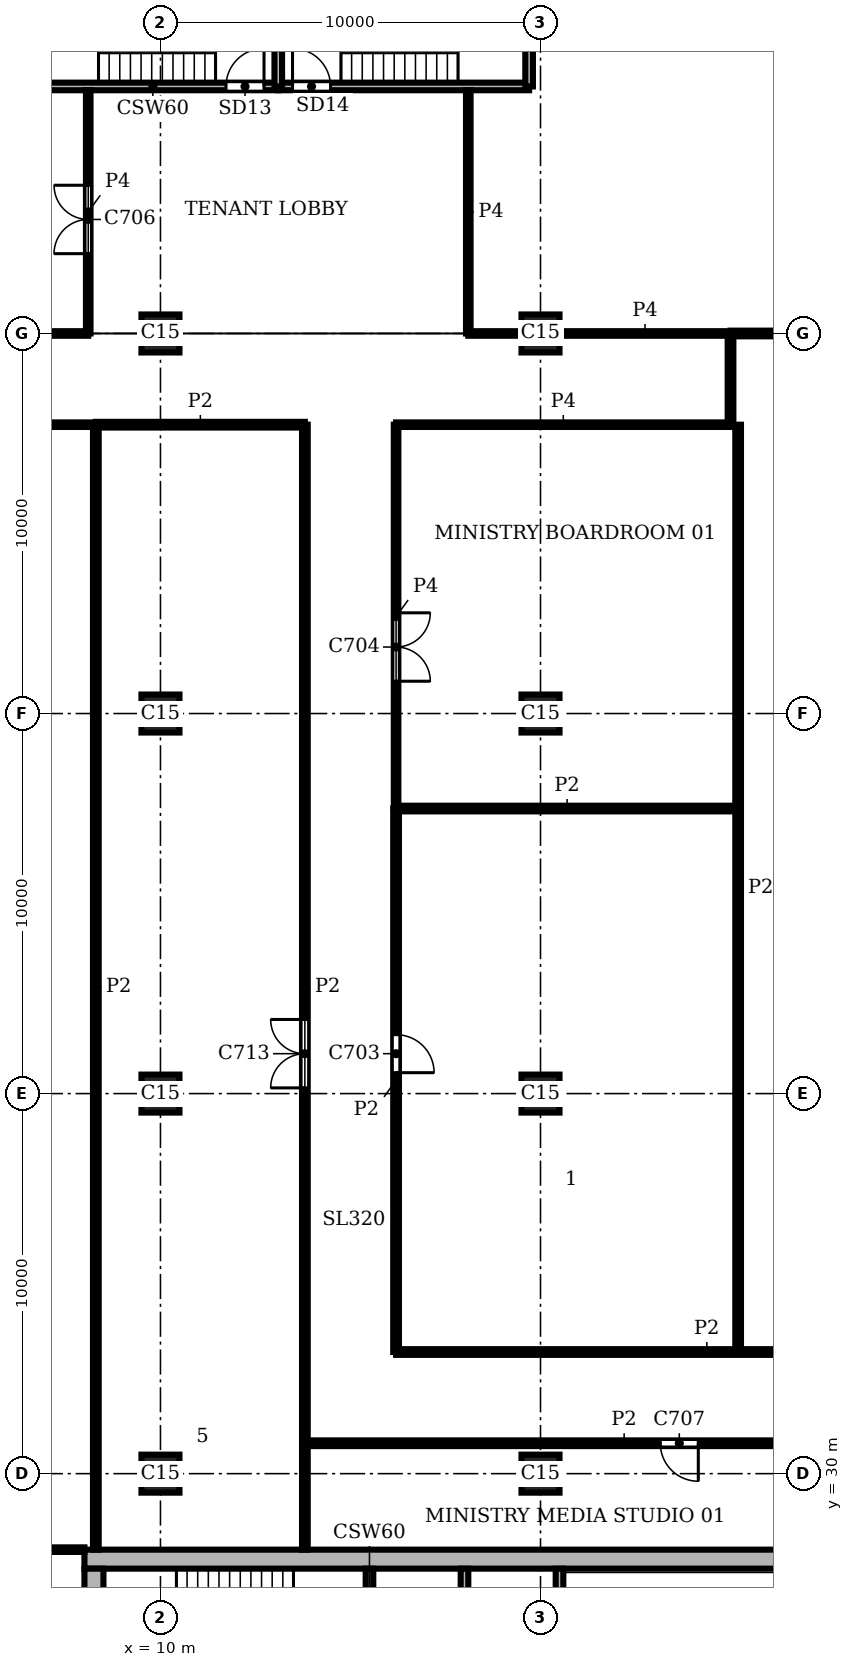
"""IFC4 building model, lengths in metres.
Left out: names, types, materials, properties, quantities, classifications, styles, units other than length and angle.
Written with IfcOpenShell. Run it as: python <this file> out.ifc"""

import sys

from ifc_helpers import new_model, si_unit, direction, frame, frame_2d, origin, origin_2d, place, context, subcontext, project, spatial, rectangle, extrude, element, fill, save


model = new_model("IFC4")
c1 = context("Model", 3, precision=1e-05, world=origin(), true_north=direction((0.0, 1.0)))
c2 = subcontext(c1, "Body", "Model", "MODEL_VIEW")
j1 = project(units=[si_unit("LENGTHUNIT", "METRE"), si_unit("PLANEANGLEUNIT", "RADIAN")], contexts=[c1])
p1 = place(None, origin())
s1 = spatial("IfcSite", under=j1, at=p1, CompositionType="ELEMENT")
p2 = place(p1, origin())
s2 = spatial("IfcBuilding", under=s1, at=p2, CompositionType="ELEMENT")
p3 = place(p2, frame((0.0, 0.0, 306.0)))
s3 = spatial("IfcBuildingStorey", under=s2, at=p3, CompositionType="ELEMENT", Elevation=306.0)
for number, where, z_axis, x_axis in (
    (1, (10.0, 30.0, 0.0), (0.0, 0.0, 1.0), (1.0, 0.0, 0.0)),
    (2, (10.0, 40.0, 0.0), (0.0, 0.0, 1.0), (1.0, 0.0, 0.0)),
    (3, (10.0, 50.0, 0.0), (0.0, 0.0, 1.0), (1.0, 0.0, 0.0)),
    (4, (10.0, 60.0, 0.0), (0.0, 0.0, 1.0), (1.0, 0.0, 0.0)),
    (5, (20.0, 30.0, 0.0), (0.0, 0.0, 1.0), (1.0, 0.0, 0.0)),
    (6, (20.0, 40.0, 0.0), (0.0, 0.0, 1.0), (1.0, 0.0, 0.0)),
    (7, (20.0, 50.0, 0.0), (0.0, 0.0, 1.0), (1.0, 0.0, 0.0)),
    (8, (20.0, 60.0, 0.0), (0.0, 0.0, 1.0), (1.0, 0.0, 0.0)),
):
    element("IfcColumn", number, at=place(p3, frame(where, z_axis=z_axis, x_axis=x_axis)), inside=s3, PredefinedType="COLUMN", context=c2, shape_type="SweptSolid", body=[
        extrude(rectangle(XDim=1.0, YDim=1.0, at=origin_2d()), origin(), (0.0, 0.0, 1.0), 3.9),
    ])
p4 = place(p3, frame((28.0, 27.75, 0.0), z_axis=(0.0, 0.0, 1.0), x_axis=(-1.0, 0.0, 0.0)))
e9 = element("IfcWall", 9, at=p4, inside=s3, PredefinedType="SHEAR", context=c2, shape_type="SweptSolid", body=[
    extrude(rectangle(XDim=20.0, YDim=0.5, at=frame_2d((10.0, 0.0))), origin(), (0.0, 0.0, 1.0), 3.9),
])
p5 = place(p3, frame((8.25, 27.5, 0.0), z_axis=(0.0, 0.0, 1.0), x_axis=(0.0, -1.0, 0.0)))
e10 = element("IfcWall", 10, at=p5, inside=s3, PredefinedType="SHEAR", context=c2, shape_type="SweptSolid", body=[
    extrude(rectangle(XDim=19.0, YDim=0.5, at=frame_2d((9.5, 0.0))), origin(), (0.0, 0.0, 1.0), 3.9),
])
p6 = place(p3, frame((6.5, 66.5, 0.0), z_axis=(0.0, 0.0, 1.0), x_axis=(1.0, 0.0, 0.0)))
e11 = element("IfcWall", 11, at=p6, inside=s3, PredefinedType="SHEAR", context=c2, shape_type="SweptSolid", body=[
    extrude(rectangle(XDim=6.6, YDim=0.2, at=frame_2d((3.3, 0.0))), origin(), (0.0, 0.0, 1.0), 3.58),
])
p7 = place(p6, frame((5.225, 0.0, 0.0)))
e12 = element("IfcOpeningElement", 12, at=p7, cuts=e11, PredefinedType="OPENING", context=c2, shape_type="SweptSolid", body=[
    extrude(rectangle(XDim=1.0, YDim=2.1, at=frame_2d((0.5, 1.05))), frame((0.0, 0.11, 0.0), z_axis=(0.0, -1.0, 0.0), x_axis=(1.0, 0.0, 0.0)), (0.0, 0.0, 1.0), 0.22),
])
p8 = place(p3, frame((13.1, 66.5, 0.0), z_axis=(0.0, 0.0, 1.0), x_axis=(1.0, 0.0, 0.0)))
e13 = element("IfcWall", 13, at=p8, inside=s3, PredefinedType="SHEAR", context=c2, shape_type="SweptSolid", body=[
    extrude(rectangle(XDim=6.6, YDim=0.2, at=frame_2d((3.3, 0.0))), origin(), (0.0, 0.0, 1.0), 3.58),
])
p9 = place(p8, frame((0.375, 0.0, 0.0)))
e14 = element("IfcOpeningElement", 14, at=p9, cuts=e13, PredefinedType="OPENING", context=c2, shape_type="SweptSolid", body=[
    extrude(rectangle(XDim=1.0, YDim=2.1, at=frame_2d((0.5, 1.05))), frame((0.0, 0.11, 0.0), z_axis=(0.0, -1.0, 0.0), x_axis=(1.0, 0.0, 0.0)), (0.0, 0.0, 1.0), 0.22),
])
p10 = place(p3, frame((13.1, 66.5, 0.0), z_axis=(0.0, 0.0, 1.0), x_axis=(0.0, 1.0, 0.0)))
e15 = element("IfcWall", 15, at=p10, inside=s3, PredefinedType="SHEAR", context=c2, shape_type="SweptSolid", body=[
    extrude(rectangle(XDim=3.3, YDim=0.2, at=frame_2d((1.65, 0.0))), origin(), (0.0, 0.0, 1.0), 3.58),
])
p11 = place(p3, frame((15.5, 23.6, 0.0), z_axis=(0.0, 0.0, 1.0), x_axis=(0.0, 1.0, 0.0)))
e16 = element("IfcWall", 16, at=p11, inside=s3, PredefinedType="SHEAR", context=c2, shape_type="SweptSolid", body=[
    extrude(rectangle(XDim=3.9, YDim=0.2, at=frame_2d((1.95, 0.0))), origin(), (0.0, 0.0, 1.0), 3.58),
])
p12 = place(p3, frame((18.0, 20.0, 0.0), z_axis=(0.0, 0.0, 1.0), x_axis=(0.0, 1.0, 0.0)))
e17 = element("IfcWall", 17, at=p12, inside=s3, PredefinedType="SHEAR", context=c2, shape_type="SweptSolid", body=[
    extrude(rectangle(XDim=7.5, YDim=0.2, at=frame_2d((3.75, 0.0))), origin(), (0.0, 0.0, 1.0), 3.58),
])
p13 = place(p12, frame((1.2, 0.0, 0.0)))
e18 = element("IfcOpeningElement", 18, at=p13, cuts=e17, PredefinedType="OPENING", context=c2, shape_type="SweptSolid", body=[
    extrude(rectangle(XDim=1.2, YDim=2.1, at=frame_2d((0.6, 1.05))), frame((0.0, 0.11, 0.0), z_axis=(0.0, -1.0, 0.0), x_axis=(1.0, 0.0, 0.0)), (0.0, 0.0, 1.0), 0.22),
])
p14 = place(p3, frame((19.7, 66.5, 0.0), z_axis=(0.0, 0.0, 1.0), x_axis=(0.0, 1.0, 0.0)))
e19 = element("IfcWall", 19, at=p14, inside=s3, PredefinedType="SHEAR", context=c2, shape_type="SweptSolid", body=[
    extrude(rectangle(XDim=3.3, YDim=0.2, at=frame_2d((1.65, 0.0))), origin(), (0.0, 0.0, 1.0), 3.58),
])
p15 = place(p3, frame((20.5, 23.6, 0.0), z_axis=(0.0, 0.0, 1.0), x_axis=(0.0, 1.0, 0.0)))
e20 = element("IfcWall", 20, at=p15, inside=s3, PredefinedType="SHEAR", context=c2, shape_type="SweptSolid", body=[
    extrude(rectangle(XDim=3.9, YDim=0.2, at=frame_2d((1.95, 0.0))), origin(), (0.0, 0.0, 1.0), 3.58),
])
p16 = place(p3, frame((8.3, 28.0, 0.0), z_axis=(0.0, 0.0, 1.0), x_axis=(0.0, 1.0, 0.0)))
e21 = element("IfcWall", 21, at=p16, inside=s3, PredefinedType="PARTITIONING", context=c2, shape_type="SweptSolid", body=[
    extrude(rectangle(XDim=29.6, YDim=0.15, at=frame_2d((14.8, 0.0))), origin(), (0.0, 0.0, 1.0), 3.58),
])
p17 = place(p3, frame((13.8, 28.0, 0.0), z_axis=(0.0, 0.0, 1.0), x_axis=(0.0, 1.0, 0.0)))
e22 = element("IfcWall", 22, at=p17, inside=s3, PredefinedType="PARTITIONING", context=c2, shape_type="SweptSolid", body=[
    extrude(rectangle(XDim=29.6, YDim=0.15, at=frame_2d((14.8, 0.0))), origin(), (0.0, 0.0, 1.0), 3.58),
])
p18 = place(p17, frame((12.15, 0.0, 0.0)))
e23 = element("IfcOpeningElement", 23, at=p18, cuts=e22, PredefinedType="OPENING", context=c2, shape_type="SweptSolid", body=[
    extrude(rectangle(XDim=1.8, YDim=2.1, at=frame_2d((0.9, 1.05))), frame((0.0, 0.085, 0.0), z_axis=(0.0, -1.0, 0.0), x_axis=(1.0, 0.0, 0.0)), (0.0, 0.0, 1.0), 0.17),
])
p19 = place(p3, frame((16.2, 33.2, 0.0), z_axis=(0.0, 0.0, 1.0), x_axis=(0.0, 1.0, 0.0)))
e24 = element("IfcWall", 24, at=p19, inside=s3, PredefinedType="PARTITIONING", context=c2, shape_type="SweptSolid", body=[
    extrude(rectangle(XDim=14.3, YDim=0.15, at=frame_2d((7.15, 0.0))), origin(), (0.0, 0.0, 1.0), 3.58),
])
p20 = place(p19, frame((7.35, 0.0, 0.0)))
e25 = element("IfcOpeningElement", 25, at=p20, cuts=e24, PredefinedType="OPENING", context=c2, shape_type="SweptSolid", body=[
    extrude(rectangle(XDim=1.0, YDim=2.1, at=frame_2d((0.5, 1.05))), frame((0.0, 0.085, 0.0), z_axis=(0.0, -1.0, 0.0), x_axis=(1.0, 0.0, 0.0)), (0.0, 0.0, 1.0), 0.17),
])
p21 = place(p3, frame((25.0, 57.6, 0.0), z_axis=(0.0, 0.0, 1.0), x_axis=(0.0, 1.0, 0.0)))
e26 = element("IfcWall", 26, at=p21, inside=s3, PredefinedType="PARTITIONING", context=c2, shape_type="SweptSolid", body=[
    extrude(rectangle(XDim=2.4, YDim=0.15, at=frame_2d((1.2, 0.0))), origin(), (0.0, 0.0, 1.0), 3.58),
])
p22 = place(p3, frame((25.2, 33.2, 0.0), z_axis=(0.0, 0.0, 1.0), x_axis=(0.0, 1.0, 0.0)))
e27 = element("IfcWall", 27, at=p22, inside=s3, PredefinedType="PARTITIONING", context=c2, shape_type="SweptSolid", body=[
    extrude(rectangle(XDim=24.4, YDim=0.15, at=frame_2d((12.2, 0.0))), origin(), (0.0, 0.0, 1.0), 3.58),
])
p23 = place(p3, frame((13.802, 30.8, 0.0), z_axis=(0.0, 0.0, 1.0), x_axis=(1.0, 0.0, 0.0)))
e28 = element("IfcWall", 28, at=p23, inside=s3, PredefinedType="PARTITIONING", context=c2, shape_type="SweptSolid", body=[
    extrude(rectangle(XDim=16.797, YDim=0.15, at=frame_2d((8.398, 0.0))), origin(), (0.0, 0.0, 1.0), 3.58),
])
p24 = place(p23, frame((9.35, 0.0, 0.0)))
e29 = element("IfcOpeningElement", 29, at=p24, cuts=e28, PredefinedType="OPENING", context=c2, shape_type="SweptSolid", body=[
    extrude(rectangle(XDim=1.0, YDim=2.1, at=frame_2d((0.5, 1.05))), frame((0.0, 0.085, 0.0), z_axis=(0.0, -1.0, 0.0), x_axis=(1.0, 0.0, 0.0)), (0.0, 0.0, 1.0), 0.17),
])
p25 = place(p3, frame((16.2, 33.2, 0.0), z_axis=(0.0, 0.0, 1.0), x_axis=(1.0, 0.0, 0.0)))
e30 = element("IfcWall", 30, at=p25, inside=s3, PredefinedType="PARTITIONING", context=c2, shape_type="SweptSolid", body=[
    extrude(rectangle(XDim=16.352, YDim=0.15, at=frame_2d((8.176, 0.0))), origin(), (0.0, 0.0, 1.0), 3.58),
])
p26 = place(p25, frame((10.85, 0.0, 0.0)))
e31 = element("IfcOpeningElement", 31, at=p26, cuts=e30, PredefinedType="OPENING", context=c2, shape_type="SweptSolid", body=[
    extrude(rectangle(XDim=1.0, YDim=2.1, at=frame_2d((0.5, 1.05))), frame((0.0, 0.085, 0.0), z_axis=(0.0, -1.0, 0.0), x_axis=(1.0, 0.0, 0.0)), (0.0, 0.0, 1.0), 0.17),
])
p27 = place(p3, frame((16.2, 47.5, 0.0), z_axis=(0.0, 0.0, 1.0), x_axis=(1.0, 0.0, 0.0)))
e32 = element("IfcWall", 32, at=p27, inside=s3, PredefinedType="PARTITIONING", context=c2, shape_type="SweptSolid", body=[
    extrude(rectangle(XDim=9.0, YDim=0.15, at=frame_2d((4.5, 0.0))), origin(), (0.0, 0.0, 1.0), 3.58),
])
p28 = place(p3, frame((8.3, 57.6, 0.0), z_axis=(0.0, 0.0, 1.0), x_axis=(1.0, 0.0, 0.0)))
e33 = element("IfcWall", 33, at=p28, inside=s3, PredefinedType="PARTITIONING", context=c2, shape_type="SweptSolid", body=[
    extrude(rectangle(XDim=5.5, YDim=0.15, at=frame_2d((2.75, 0.0))), origin(), (0.0, 0.0, 1.0), 3.58),
])
p29 = place(p3, frame((25.0, 60.0, 0.0), z_axis=(0.0, 0.0, 1.0), x_axis=(1.0, 0.0, 0.0)))
e34 = element("IfcWall", 34, at=p29, inside=s3, PredefinedType="PARTITIONING", context=c2, shape_type="SweptSolid", body=[
    extrude(rectangle(XDim=4.575, YDim=0.15, at=frame_2d((2.288, 0.0))), origin(), (0.0, 0.0, 1.0), 3.58),
])
p30 = place(p3, frame((8.1, 60.0, 0.0), z_axis=(0.0, 0.0, 1.0), x_axis=(0.0, 1.0, 0.0)))
e35 = element("IfcWall", 35, at=p30, inside=s3, PredefinedType="PARTITIONING", context=c2, shape_type="SweptSolid", body=[
    extrude(rectangle(XDim=6.4, YDim=0.12, at=frame_2d((3.2, 0.0))), origin(), (0.0, 0.0, 1.0), 3.58),
])
p31 = place(p30, frame((2.1, 0.0, 0.0)))
e36 = element("IfcOpeningElement", 36, at=p31, cuts=e35, PredefinedType="OPENING", context=c2, shape_type="SweptSolid", body=[
    extrude(rectangle(XDim=1.8, YDim=2.1, at=frame_2d((0.9, 1.05))), frame((0.0, 0.07, 0.0), z_axis=(0.0, -1.0, 0.0), x_axis=(1.0, 0.0, 0.0)), (0.0, 0.0, 1.0), 0.14),
])
p32 = place(p3, frame((16.2, 47.5, 0.0), z_axis=(0.0, 0.0, 1.0), x_axis=(0.0, 1.0, 0.0)))
e37 = element("IfcWall", 37, at=p32, inside=s3, PredefinedType="PARTITIONING", context=c2, shape_type="SweptSolid", body=[
    extrude(rectangle(XDim=10.1, YDim=0.12, at=frame_2d((5.05, 0.0))), origin(), (0.0, 0.0, 1.0), 3.58),
])
p33 = place(p32, frame((3.35, 0.0, 0.0)))
e38 = element("IfcOpeningElement", 38, at=p33, cuts=e37, PredefinedType="OPENING", context=c2, shape_type="SweptSolid", body=[
    extrude(rectangle(XDim=1.8, YDim=2.1, at=frame_2d((0.9, 1.05))), frame((0.0, 0.07, 0.0), z_axis=(0.0, -1.0, 0.0), x_axis=(1.0, 0.0, 0.0)), (0.0, 0.0, 1.0), 0.14),
])
p34 = place(p3, frame((18.1, 60.0, 0.0), z_axis=(0.0, 0.0, 1.0), x_axis=(0.0, 1.0, 0.0)))
e39 = element("IfcWall", 39, at=p34, inside=s3, PredefinedType="PARTITIONING", context=c2, shape_type="SweptSolid", body=[
    extrude(rectangle(XDim=6.4, YDim=0.12, at=frame_2d((3.2, 0.0))), origin(), (0.0, 0.0, 1.0), 3.58),
])
p35 = place(p3, frame((5.6, 28.0, 0.0), z_axis=(0.0, 0.0, 1.0), x_axis=(1.0, 0.0, 0.0)))
e40 = element("IfcWall", 40, at=p35, inside=s3, PredefinedType="PARTITIONING", context=c2, shape_type="SweptSolid", body=[
    extrude(rectangle(XDim=2.4, YDim=0.12, at=frame_2d((1.2, 0.0))), origin(), (0.0, 0.0, 1.0), 3.58),
])
p36 = place(p3, frame((5.0, 57.6, 0.0), z_axis=(0.0, 0.0, 1.0), x_axis=(1.0, 0.0, 0.0)))
e41 = element("IfcWall", 41, at=p36, inside=s3, PredefinedType="PARTITIONING", context=c2, shape_type="SweptSolid", body=[
    extrude(rectangle(XDim=3.3, YDim=0.12, at=frame_2d((1.65, 0.0))), origin(), (0.0, 0.0, 1.0), 3.58),
])
p37 = place(p3, frame((16.2, 57.6, 0.0), z_axis=(0.0, 0.0, 1.0), x_axis=(1.0, 0.0, 0.0)))
e42 = element("IfcWall", 42, at=p37, inside=s3, PredefinedType="PARTITIONING", context=c2, shape_type="SweptSolid", body=[
    extrude(rectangle(XDim=8.8, YDim=0.12, at=frame_2d((4.4, 0.0))), origin(), (0.0, 0.0, 1.0), 3.58),
])
p38 = place(p3, frame((5.0, 60.0, 0.0), z_axis=(0.0, 0.0, 1.0), x_axis=(1.0, 0.0, 0.0)))
e43 = element("IfcWall", 43, at=p38, inside=s3, PredefinedType="PARTITIONING", context=c2, shape_type="SweptSolid", body=[
    extrude(rectangle(XDim=3.1, YDim=0.12, at=frame_2d((1.55, 0.0))), origin(), (0.0, 0.0, 1.0), 3.58),
])
p39 = place(p3, frame((18.1, 60.0, 0.0), z_axis=(0.0, 0.0, 1.0), x_axis=(1.0, 0.0, 0.0)))
e44 = element("IfcWall", 44, at=p39, inside=s3, PredefinedType="PARTITIONING", context=c2, shape_type="SweptSolid", body=[
    extrude(rectangle(XDim=1.4, YDim=0.12, at=frame_2d((0.7, 0.0))), origin(), (0.0, 0.0, 1.0), 3.58),
])
p40 = place(p3, frame((20.5, 60.0, 0.0), z_axis=(0.0, 0.0, 1.0), x_axis=(1.0, 0.0, 0.0)))
e45 = element("IfcWall", 45, at=p40, inside=s3, PredefinedType="PARTITIONING", context=c2, shape_type="SweptSolid", body=[
    extrude(rectangle(XDim=4.5, YDim=0.12, at=frame_2d((2.25, 0.0))), origin(), (0.0, 0.0, 1.0), 3.58),
])
p41 = place(p7, origin())
e46 = element("IfcDoor", 46, at=p41, inside=s3, OperationType="SINGLE_SWING_RIGHT", PredefinedType="DOOR", context=c2, shape_type="SweptSolid", body=[
    extrude(rectangle(XDim=1.0, YDim=2.1, at=frame_2d((0.5, 1.05))), frame((0.0, 0.025, 0.0), z_axis=(0.0, -1.0, 0.0), x_axis=(1.0, 0.0, 0.0)), (0.0, 0.0, 1.0), 0.05),
])
fill(e12, e46)
p42 = place(p9, origin())
e47 = element("IfcDoor", 47, at=p42, inside=s3, OperationType="SINGLE_SWING_LEFT", PredefinedType="DOOR", context=c2, shape_type="SweptSolid", body=[
    extrude(rectangle(XDim=1.0, YDim=2.1, at=frame_2d((0.5, 1.05))), frame((0.0, 0.025, 0.0), z_axis=(0.0, -1.0, 0.0), x_axis=(1.0, 0.0, 0.0)), (0.0, 0.0, 1.0), 0.05),
])
fill(e14, e47)
p43 = place(p20, frame((1.0, 0.0, 0.0), z_axis=(0.0, 0.0, 1.0), x_axis=(-1.0, 0.0, 0.0)))
e48 = element("IfcDoor", 48, at=p43, inside=s3, OperationType="SINGLE_SWING_RIGHT", PredefinedType="DOOR", context=c2, shape_type="SweptSolid", body=[
    extrude(rectangle(XDim=1.0, YDim=2.1, at=frame_2d((0.5, 1.05))), frame((0.0, 0.025, 0.0), z_axis=(0.0, -1.0, 0.0), x_axis=(1.0, 0.0, 0.0)), (0.0, 0.0, 1.0), 0.05),
])
fill(e25, e48)
p44 = place(p33, frame((1.8, 0.0, 0.0), z_axis=(0.0, 0.0, 1.0), x_axis=(-1.0, 0.0, 0.0)))
e49 = element("IfcDoor", 49, at=p44, inside=s3, OperationType="DOUBLE_DOOR_SINGLE_SWING", PredefinedType="DOOR", context=c2, shape_type="SweptSolid", body=[
    extrude(rectangle(XDim=1.8, YDim=2.1, at=frame_2d((0.9, 1.05))), frame((0.0, 0.025, 0.0), z_axis=(0.0, -1.0, 0.0), x_axis=(1.0, 0.0, 0.0)), (0.0, 0.0, 1.0), 0.05),
])
fill(e38, e49)
p45 = place(p31, origin())
e50 = element("IfcDoor", 50, at=p45, inside=s3, OperationType="DOUBLE_DOOR_SINGLE_SWING", PredefinedType="DOOR", context=c2, shape_type="SweptSolid", body=[
    extrude(rectangle(XDim=1.8, YDim=2.1, at=frame_2d((0.9, 1.05))), frame((0.0, 0.025, 0.0), z_axis=(0.0, -1.0, 0.0), x_axis=(1.0, 0.0, 0.0)), (0.0, 0.0, 1.0), 0.05),
])
fill(e36, e50)
p46 = place(p24, frame((1.0, 0.0, 0.0), z_axis=(0.0, 0.0, 1.0), x_axis=(-1.0, 0.0, 0.0)))
e51 = element("IfcDoor", 51, at=p46, inside=s3, OperationType="SINGLE_SWING_LEFT", PredefinedType="DOOR", context=c2, shape_type="SweptSolid", body=[
    extrude(rectangle(XDim=1.0, YDim=2.1, at=frame_2d((0.5, 1.05))), frame((0.0, 0.025, 0.0), z_axis=(0.0, -1.0, 0.0), x_axis=(1.0, 0.0, 0.0)), (0.0, 0.0, 1.0), 0.05),
])
fill(e29, e51)
p47 = place(p18, origin())
e52 = element("IfcDoor", 52, at=p47, inside=s3, OperationType="DOUBLE_DOOR_SINGLE_SWING", PredefinedType="DOOR", context=c2, shape_type="SweptSolid", body=[
    extrude(rectangle(XDim=1.8, YDim=2.1, at=frame_2d((0.9, 1.05))), frame((0.0, 0.025, 0.0), z_axis=(0.0, -1.0, 0.0), x_axis=(1.0, 0.0, 0.0)), (0.0, 0.0, 1.0), 0.05),
])
fill(e23, e52)
save(model, sys.argv[1])
